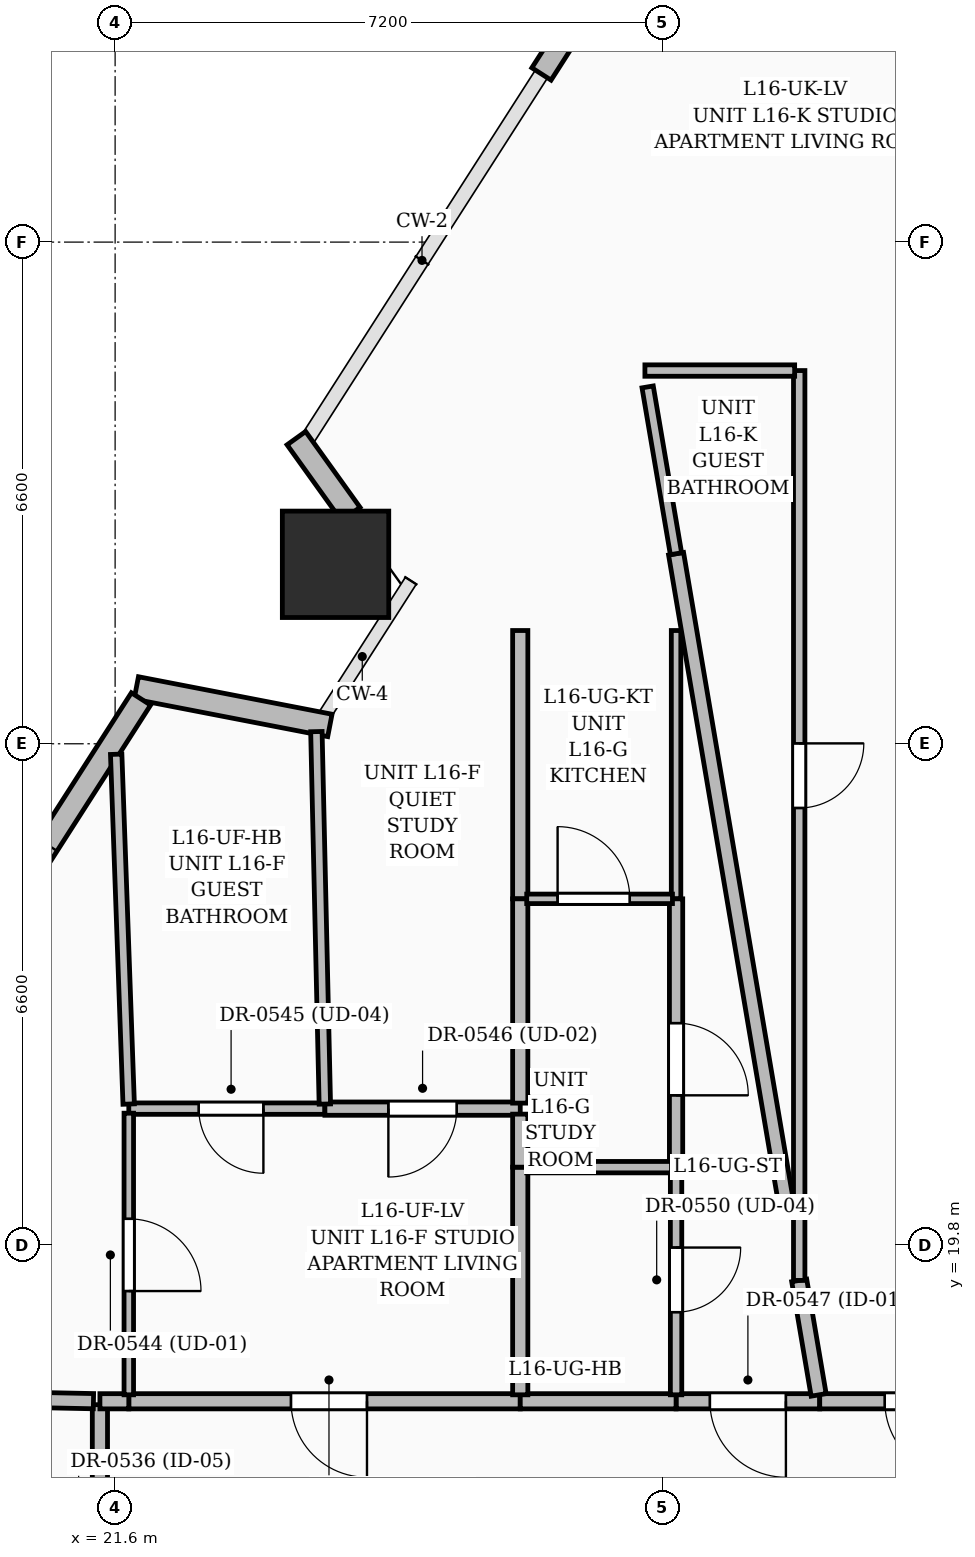
"""IFC4 building model, lengths in metres.
Left out: names, types, materials, properties, quantities, classifications, styles, units other than length and angle.
Written with IfcOpenShell. Run it as: python <this file> out.ifc"""

import sys

from ifc_helpers import new_model, si_unit, direction, frame, frame_2d, origin, origin_2d, place, context, subcontext, project, spatial, rectangle, extrude, element, fill, save


model = new_model("IFC4")
c1 = context("Model", 3, precision=1e-05, world=origin(), true_north=direction((0.0, 1.0)))
c2 = subcontext(c1, "Body", "Model", "MODEL_VIEW")
j1 = project(units=[si_unit("LENGTHUNIT", "METRE"), si_unit("PLANEANGLEUNIT", "RADIAN")], contexts=[c1])
p1 = place(None, origin())
s1 = spatial("IfcSite", under=j1, at=p1, CompositionType="ELEMENT")
p2 = place(p1, origin())
s2 = spatial("IfcBuilding", under=s1, at=p2, CompositionType="ELEMENT")
p3 = place(p2, frame((0.0, 0.0, 67.8)))
s3 = spatial("IfcBuildingStorey", under=s2, at=p3, CompositionType="ELEMENT", Elevation=67.8)
p4 = place(p3, frame((24.5, 28.761, 0.0), z_axis=(0.0, 0.0, 1.0), x_axis=(1.0, 0.0, 0.0)))
e1 = element("IfcColumn", 1, at=p4, inside=s3, PredefinedType="COLUMN", context=c2, shape_type="SweptSolid", body=[
    extrude(rectangle(XDim=1.4, YDim=1.4, at=origin_2d()), origin(), (0.0, 0.0, 1.0), 3.6),
])
p5 = place(p3, frame((21.879, 27.135, 0.0), z_axis=(0.0, 0.0, 1.0), x_axis=(0.981760587394, -0.190121406053, 0.0)))
e2 = element("IfcWall", 2, at=p5, inside=s3, PredefinedType="SOLIDWALL", context=c2, shape_type="SweptSolid", body=[
    extrude(rectangle(XDim=2.594, YDim=0.3, at=frame_2d((1.297, 0.0))), origin(), (0.0, 0.0, 1.0), 2.375),
])
p6 = place(p3, frame((24.7, 29.423, 0.0), z_axis=(0.0, 0.0, 1.0), x_axis=(-0.583004903736, 0.812468634607, 0.0)))
e3 = element("IfcWall", 3, at=p6, inside=s3, PredefinedType="SOLIDWALL", context=c2, shape_type="SweptSolid", body=[
    extrude(rectangle(XDim=1.228, YDim=0.3, at=frame_2d((0.614, 0.0))), origin(), (0.0, 0.0, 1.0), 2.375),
])
p7 = place(p3, frame((27.209, 35.212, 0.0), z_axis=(0.0, 0.0, 1.0), x_axis=(0.539522163193, 0.841971398222, 0.0)))
e4 = element("IfcWall", 4, at=p7, inside=s3, PredefinedType="SOLIDWALL", context=c2, shape_type="SweptSolid", body=[
    extrude(rectangle(XDim=5.826, YDim=0.3, at=frame_2d((2.913, 0.0))), origin(), (0.0, 0.0, 1.0), 3.35),
])
p8 = place(p7, frame((0.625, 0.0, 0.6)))
e5 = element("IfcOpeningElement", 5, at=p8, cuts=e4, PredefinedType="OPENING", context=c2, shape_type="SweptSolid", body=[
    extrude(rectangle(XDim=1.8, YDim=2.1, at=frame_2d((0.9, 1.05))), frame((0.0, 0.16, 0.0), z_axis=(0.0, -1.0, 0.0), x_axis=(1.0, 0.0, 0.0)), (0.0, 0.0, 1.0), 0.32),
])
p9 = place(p3, frame((18.701, 21.934, 0.0), z_axis=(0.0, 0.0, 1.0), x_axis=(0.539511671319, 0.841978121159, 0.0)))
e6 = element("IfcWall", 6, at=p9, inside=s3, PredefinedType="SOLIDWALL", context=c2, shape_type="SweptSolid", body=[
    extrude(rectangle(XDim=6.004, YDim=0.3, at=frame_2d((3.002, 0.0))), origin(), (0.0, 0.0, 1.0), 3.35),
])
p10 = place(p9, frame((1.325, 0.0, 0.6)))
e7 = element("IfcOpeningElement", 7, at=p10, cuts=e6, PredefinedType="OPENING", context=c2, shape_type="SweptSolid", body=[
    extrude(rectangle(XDim=2.4, YDim=2.1, at=frame_2d((1.2, 1.05))), frame((0.0, 0.16, 0.0), z_axis=(0.0, -1.0, 0.0), x_axis=(1.0, 0.0, 0.0)), (0.0, 0.0, 1.0), 0.32),
])
p11 = place(p3, frame((21.4, 17.705, 0.0), z_axis=(0.0, 0.0, 1.0), x_axis=(0.0, -1.0, 0.0)))
e8 = element("IfcWall", 8, at=p11, inside=s3, PredefinedType="PARTITIONING", context=c2, shape_type="SweptSolid", body=[
    extrude(rectangle(XDim=4.955, YDim=0.2, at=frame_2d((2.478, 0.0))), origin(), (0.0, 0.0, 1.0), 2.787),
])
p12 = place(p11, frame((1.597, 0.0, 0.0)))
e9 = element("IfcOpeningElement", 9, at=p12, cuts=e8, PredefinedType="OPENING", context=c2, shape_type="SweptSolid", body=[
    extrude(rectangle(XDim=1.6, YDim=2.3, at=frame_2d((0.8, 1.15))), frame((0.0, 0.11, 0.0), z_axis=(0.0, -1.0, 0.0), x_axis=(1.0, 0.0, 0.0)), (0.0, 0.0, 1.0), 0.22),
])
p13 = place(p3, frame((26.93, 17.75, 0.0), z_axis=(0.0, 0.0, 1.0), x_axis=(-1.0, 0.0, 0.0)))
e10 = element("IfcWall", 10, at=p13, inside=s3, PredefinedType="PARTITIONING", context=c2, shape_type="SweptSolid", body=[
    extrude(rectangle(XDim=5.15, YDim=0.2, at=frame_2d((2.575, 0.0))), origin(), (0.0, 0.0, 1.0), 2.279),
])
p14 = place(p13, frame((2.016, 0.0, 0.0)))
e11 = element("IfcOpeningElement", 11, at=p14, cuts=e10, PredefinedType="OPENING", context=c2, shape_type="SweptSolid", body=[
    extrude(rectangle(XDim=1.0, YDim=2.2, at=frame_2d((0.5, 1.1))), frame((0.0, 0.11, 0.0), z_axis=(0.0, -1.0, 0.0), x_axis=(1.0, 0.0, 0.0)), (0.0, 0.0, 1.0), 0.22),
])
p15 = place(p3, frame((21.78, 17.75, 0.0), z_axis=(0.0, 0.0, 1.0), x_axis=(-1.0, 0.0, 0.0)))
e12 = element("IfcWall", 12, at=p15, inside=s3, PredefinedType="PARTITIONING", context=c2, shape_type="SweptSolid", body=[
    extrude(rectangle(XDim=0.38, YDim=0.2, at=frame_2d((0.19, 0.0))), origin(), (0.0, 0.0, 1.0), 3.35),
])
p16 = place(p3, frame((30.87, 17.75, 0.0), z_axis=(0.0, 0.0, 1.0), x_axis=(-1.0, 0.0, 0.0)))
e13 = element("IfcWall", 13, at=p16, inside=s3, PredefinedType="PARTITIONING", context=c2, shape_type="SweptSolid", body=[
    extrude(rectangle(XDim=1.89, YDim=0.2, at=frame_2d((0.945, 0.0))), origin(), (0.0, 0.0, 1.0), 3.35),
])
p17 = place(p16, frame((0.445, 0.0, 0.0)))
e14 = element("IfcOpeningElement", 14, at=p17, cuts=e13, PredefinedType="OPENING", context=c2, shape_type="SweptSolid", body=[
    extrude(rectangle(XDim=1.0, YDim=2.2, at=frame_2d((0.5, 1.1))), frame((0.0, 0.11, 0.0), z_axis=(0.0, -1.0, 0.0), x_axis=(1.0, 0.0, 0.0)), (0.0, 0.0, 1.0), 0.22),
])
p18 = place(p3, frame((28.98, 17.75, 0.0), z_axis=(0.0, 0.0, 1.0), x_axis=(-1.0, 0.0, 0.0)))
e15 = element("IfcWall", 15, at=p18, inside=s3, PredefinedType="PARTITIONING", context=c2, shape_type="SweptSolid", body=[
    extrude(rectangle(XDim=2.05, YDim=0.2, at=frame_2d((1.025, 0.0))), origin(), (0.0, 0.0, 1.0), 2.787),
])
p19 = place(p3, frame((34.06, 17.75, 0.0), z_axis=(0.0, 0.0, 1.0), x_axis=(-1.0, 0.0, 0.0)))
e16 = element("IfcWall", 16, at=p19, inside=s3, PredefinedType="PARTITIONING", context=c2, shape_type="SweptSolid", body=[
    extrude(rectangle(XDim=3.19, YDim=0.2, at=frame_2d((1.595, 0.0))), origin(), (0.0, 0.0, 1.0), 2.309),
])
p20 = place(p19, frame((1.334, 0.0, 0.0)))
e17 = element("IfcOpeningElement", 17, at=p20, cuts=e16, PredefinedType="OPENING", context=c2, shape_type="SweptSolid", body=[
    extrude(rectangle(XDim=1.0, YDim=2.2, at=frame_2d((0.5, 1.1))), frame((0.0, 0.11, 0.0), z_axis=(0.0, -1.0, 0.0), x_axis=(1.0, 0.0, 0.0)), (0.0, 0.0, 1.0), 0.22),
])
p21 = place(p3, frame((21.315, 17.751, 0.0), z_axis=(0.0, 0.0, 1.0), x_axis=(-0.999792117948, 0.020389234651, 0.0)))
e18 = element("IfcWall", 18, at=p21, inside=s3, PredefinedType="PARTITIONING", context=c2, shape_type="SweptSolid", body=[
    extrude(rectangle(XDim=5.089, YDim=0.2, at=frame_2d((2.544, 0.0))), origin(), (0.0, 0.0, 1.0), 2.37),
])
p22 = place(p3, frame((24.36, 21.6, 0.0), z_axis=(0.0, 0.0, 1.0), x_axis=(-1.0, 0.0, 0.0)))
e19 = element("IfcWall", 19, at=p22, inside=s3, PredefinedType="PARTITIONING", context=c2, shape_type="SweptSolid", body=[
    extrude(rectangle(XDim=2.58, YDim=0.15, at=frame_2d((1.29, 0.0))), origin(), (0.0, 0.0, 1.0), 2.787),
])
p23 = place(p22, frame((0.809, 0.0, 0.0)))
e20 = element("IfcOpeningElement", 20, at=p23, cuts=e19, PredefinedType="OPENING", context=c2, shape_type="SweptSolid", body=[
    extrude(rectangle(XDim=0.85, YDim=2.1, at=frame_2d((0.425, 1.05))), frame((0.0, 0.085, 0.0), z_axis=(0.0, -1.0, 0.0), x_axis=(1.0, 0.0, 0.0)), (0.0, 0.0, 1.0), 0.17),
])
p24 = place(p3, frame((21.78, 21.54, 0.0), z_axis=(0.0, 0.0, 1.0), x_axis=(0.0, -1.0, 0.0)))
e21 = element("IfcWall", 21, at=p24, inside=s3, PredefinedType="PARTITIONING", context=c2, shape_type="SweptSolid", body=[
    extrude(rectangle(XDim=3.705, YDim=0.125, at=frame_2d((1.853, 0.0))), origin(), (0.0, 0.0, 1.0), 2.279),
])
p25 = place(p24, frame((1.39, 0.0, 0.0)))
e22 = element("IfcOpeningElement", 22, at=p25, cuts=e21, PredefinedType="OPENING", context=c2, shape_type="SweptSolid", body=[
    extrude(rectangle(XDim=0.95, YDim=2.2, at=frame_2d((0.475, 1.1))), frame((0.0, 0.072, 0.0), z_axis=(0.0, -1.0, 0.0), x_axis=(1.0, 0.0, 0.0)), (0.0, 0.0, 1.0), 0.145),
])
p26 = place(p3, frame((26.93, 21.6, 0.0), z_axis=(0.0, 0.0, 1.0), x_axis=(-1.0, 0.0, 0.0)))
e23 = element("IfcWall", 23, at=p26, inside=s3, PredefinedType="PARTITIONING", context=c2, shape_type="SweptSolid", body=[
    extrude(rectangle(XDim=2.57, YDim=0.175, at=frame_2d((1.285, 0.0))), origin(), (0.0, 0.0, 1.0), 3.35),
])
p27 = place(p26, frame((0.835, 0.0, 0.0)))
e24 = element("IfcOpeningElement", 24, at=p27, cuts=e23, PredefinedType="OPENING", context=c2, shape_type="SweptSolid", body=[
    extrude(rectangle(XDim=0.9, YDim=2.15, at=frame_2d((0.45, 1.075))), frame((0.0, 0.097, 0.0), z_axis=(0.0, -1.0, 0.0), x_axis=(1.0, 0.0, 0.0)), (0.0, 0.0, 1.0), 0.195),
])
p28 = place(p3, frame((26.93, 17.835, 0.0), z_axis=(0.0, 0.0, 1.0), x_axis=(0.0, 1.0, 0.0)))
e25 = element("IfcWall", 25, at=p28, inside=s3, PredefinedType="PARTITIONING", context=c2, shape_type="SweptSolid", body=[
    extrude(rectangle(XDim=2.995, YDim=0.2, at=frame_2d((1.498, 0.0))), origin(), (0.0, 0.0, 1.0), 2.787),
])
p29 = place(p3, frame((26.93, 20.83, 0.0), z_axis=(0.0, 0.0, 1.0), x_axis=(0.0, 1.0, 0.0)))
e26 = element("IfcWall", 26, at=p29, inside=s3, PredefinedType="PARTITIONING", context=c2, shape_type="SweptSolid", body=[
    extrude(rectangle(XDim=0.698, YDim=0.2, at=frame_2d((0.349, 0.0))), origin(), (0.0, 0.0, 1.0), 2.787),
])
p30 = place(p3, frame((21.614, 26.262, 0.0), z_axis=(0.0, 0.0, 1.0), x_axis=(0.035733133252, -0.999361367668, 0.0)))
e27 = element("IfcWall", 27, at=p30, inside=s3, PredefinedType="PARTITIONING", context=c2, shape_type="SweptSolid", body=[
    extrude(rectangle(XDim=4.605, YDim=0.15, at=frame_2d((2.302, 0.0))), origin(), (0.0, 0.0, 1.0), 2.37),
])
p31 = place(p3, frame((24.359, 21.66, 0.0), z_axis=(0.0, 0.0, 1.0), x_axis=(-0.02266370042, 0.999743145354, 0.0)))
e28 = element("IfcWall", 28, at=p31, inside=s3, PredefinedType="PARTITIONING", context=c2, shape_type="SweptSolid", body=[
    extrude(rectangle(XDim=4.901, YDim=0.15, at=frame_2d((2.451, 0.0))), origin(), (0.0, 0.0, 1.0), 2.787),
])
p32 = place(p3, frame((26.93, 24.36, 0.0), z_axis=(0.0, 0.0, 1.0), x_axis=(0.0, 1.0, 0.0)))
e29 = element("IfcWall", 29, at=p32, inside=s3, PredefinedType="PARTITIONING", context=c2, shape_type="SweptSolid", body=[
    extrude(rectangle(XDim=3.53, YDim=0.2, at=frame_2d((1.765, 0.0))), origin(), (0.0, 0.0, 1.0), 2.279),
])
p33 = place(p3, frame((26.93, 21.673, 0.0), z_axis=(0.0, 0.0, 1.0), x_axis=(0.0, 1.0, 0.0)))
e30 = element("IfcWall", 30, at=p33, inside=s3, PredefinedType="PARTITIONING", context=c2, shape_type="SweptSolid", body=[
    extrude(rectangle(XDim=2.688, YDim=0.2, at=frame_2d((1.344, 0.0))), origin(), (0.0, 0.0, 1.0), 3.35),
])
p34 = place(p3, frame((28.98, 20.83, 0.0), z_axis=(0.0, 0.0, 1.0), x_axis=(0.0, -1.0, 0.0)))
e31 = element("IfcWall", 31, at=p34, inside=s3, PredefinedType="PARTITIONING", context=c2, shape_type="SweptSolid", body=[
    extrude(rectangle(XDim=2.995, YDim=0.15, at=frame_2d((1.498, 0.0))), origin(), (0.0, 0.0, 1.0), 2.787),
])
p35 = place(p34, frame((1.058, 0.0, 0.0)))
e32 = element("IfcOpeningElement", 32, at=p35, cuts=e31, PredefinedType="OPENING", context=c2, shape_type="SweptSolid", body=[
    extrude(rectangle(XDim=0.85, YDim=2.1, at=frame_2d((0.425, 1.05))), frame((0.0, 0.085, 0.0), z_axis=(0.0, -1.0, 0.0), x_axis=(1.0, 0.0, 0.0)), (0.0, 0.0, 1.0), 0.17),
])
p36 = place(p3, frame((28.98, 27.89, 0.0), z_axis=(0.0, 0.0, 1.0), x_axis=(0.0, -1.0, 0.0)))
e33 = element("IfcWall", 33, at=p36, inside=s3, PredefinedType="PARTITIONING", context=c2, shape_type="SweptSolid", body=[
    extrude(rectangle(XDim=3.53, YDim=0.125, at=frame_2d((1.765, 0.0))), origin(), (0.0, 0.0, 1.0), 3.35),
])
p37 = place(p3, frame((28.98, 24.36, 0.0), z_axis=(0.0, 0.0, 1.0), x_axis=(0.0, -1.0, 0.0)))
e34 = element("IfcWall", 34, at=p37, inside=s3, PredefinedType="PARTITIONING", context=c2, shape_type="SweptSolid", body=[
    extrude(rectangle(XDim=3.53, YDim=0.175, at=frame_2d((1.765, 0.0))), origin(), (0.0, 0.0, 1.0), 2.279),
])
p38 = place(p37, frame((1.635, 0.0, 0.0)))
e35 = element("IfcOpeningElement", 35, at=p38, cuts=e34, PredefinedType="OPENING", context=c2, shape_type="SweptSolid", body=[
    extrude(rectangle(XDim=0.95, YDim=2.2, at=frame_2d((0.475, 1.1))), frame((0.0, 0.097, 0.0), z_axis=(0.0, -1.0, 0.0), x_axis=(1.0, 0.0, 0.0)), (0.0, 0.0, 1.0), 0.195),
])
p39 = place(p3, frame((30.856, 17.834, 0.0), z_axis=(0.0, 0.0, 1.0), x_axis=(-0.167300412549, 0.98590596507, 0.0)))
e36 = element("IfcWall", 36, at=p39, inside=s3, PredefinedType="PARTITIONING", context=c2, shape_type="SweptSolid", body=[
    extrude(rectangle(XDim=1.528, YDim=0.2, at=frame_2d((0.764, 0.0))), origin(), (0.0, 0.0, 1.0), 3.35),
])
p40 = place(p3, frame((30.44, 20.284, 0.0), z_axis=(0.0, 0.0, 1.0), x_axis=(-0.167066803371, 0.98594557822, 0.0)))
e37 = element("IfcWall", 37, at=p40, inside=s3, PredefinedType="PARTITIONING", context=c2, shape_type="SweptSolid", body=[
    extrude(rectangle(XDim=8.739, YDim=0.2, at=frame_2d((4.369, 0.0))), origin(), (0.0, 0.0, 1.0), 2.279),
])
p41 = place(p3, frame((28.92, 20.83, 0.0), z_axis=(0.0, 0.0, 1.0), x_axis=(-1.0, 0.0, 0.0)))
e38 = element("IfcWall", 38, at=p41, inside=s3, PredefinedType="PARTITIONING", context=c2, shape_type="SweptSolid", body=[
    extrude(rectangle(XDim=1.905, YDim=0.15, at=frame_2d((0.953, 0.0))), origin(), (0.0, 0.0, 1.0), 3.35),
])
p42 = place(p3, frame((27.015, 24.36, 0.0), z_axis=(0.0, 0.0, 1.0), x_axis=(1.0, 0.0, 0.0)))
e39 = element("IfcWall", 39, at=p42, inside=s3, PredefinedType="PARTITIONING", context=c2, shape_type="SweptSolid", body=[
    extrude(rectangle(XDim=1.918, YDim=0.125, at=frame_2d((0.959, 0.0))), origin(), (0.0, 0.0, 1.0), 2.279),
])
p43 = place(p42, frame((0.406, 0.0, 0.0)))
e40 = element("IfcOpeningElement", 40, at=p43, cuts=e39, PredefinedType="OPENING", context=c2, shape_type="SweptSolid", body=[
    extrude(rectangle(XDim=0.95, YDim=2.2, at=frame_2d((0.475, 1.1))), frame((0.0, 0.072, 0.0), z_axis=(0.0, -1.0, 0.0), x_axis=(1.0, 0.0, 0.0)), (0.0, 0.0, 1.0), 0.145),
])
p44 = place(p3, frame((30.6, 31.31, 0.0), z_axis=(0.0, 0.0, 1.0), x_axis=(0.0, -1.0, 0.0)))
e41 = element("IfcWall", 41, at=p44, inside=s3, PredefinedType="PARTITIONING", context=c2, shape_type="SweptSolid", body=[
    extrude(rectangle(XDim=11.97, YDim=0.15, at=frame_2d((5.985, 0.0))), origin(), (0.0, 0.0, 1.0), 2.279),
])
p45 = place(p44, frame((4.905, 0.0, 0.0)))
e42 = element("IfcOpeningElement", 42, at=p45, cuts=e41, PredefinedType="OPENING", context=c2, shape_type="SweptSolid", body=[
    extrude(rectangle(XDim=0.85, YDim=2.1, at=frame_2d((0.425, 1.05))), frame((0.0, 0.085, 0.0), z_axis=(0.0, -1.0, 0.0), x_axis=(1.0, 0.0, 0.0)), (0.0, 0.0, 1.0), 0.17),
])
p46 = place(p3, frame((30.54, 31.31, 0.0), z_axis=(0.0, 0.0, 1.0), x_axis=(-1.0, 0.0, 0.0)))
e43 = element("IfcWall", 43, at=p46, inside=s3, PredefinedType="PARTITIONING", context=c2, shape_type="SweptSolid", body=[
    extrude(rectangle(XDim=1.97, YDim=0.15, at=frame_2d((0.985, 0.0))), origin(), (0.0, 0.0, 1.0), 2.787),
])
p47 = place(p3, frame((28.606, 31.095, 0.0), z_axis=(0.0, 0.0, 1.0), x_axis=(0.167545405698, -0.985864360361, 0.0)))
e44 = element("IfcWall", 44, at=p47, inside=s3, PredefinedType="PARTITIONING", context=c2, shape_type="SweptSolid", body=[
    extrude(rectangle(XDim=2.227, YDim=0.15, at=frame_2d((1.113, 0.0))), origin(), (0.0, 0.0, 1.0), 2.787),
])
p48 = place(p14, origin())
e45 = element("IfcDoor", 45, at=p48, inside=s3, OperationType="SINGLE_SWING_LEFT", PredefinedType="DOOR", context=c2, shape_type="SweptSolid", body=[
    extrude(rectangle(XDim=1.0, YDim=2.2, at=frame_2d((0.5, 1.1))), frame((0.0, 0.025, 0.0), z_axis=(0.0, -1.0, 0.0), x_axis=(1.0, 0.0, 0.0)), (0.0, 0.0, 1.0), 0.05),
])
fill(e11, e45)
p49 = place(p25, origin())
e46 = element("IfcDoor", 46, at=p49, inside=s3, OperationType="SINGLE_SWING_RIGHT", PredefinedType="DOOR", context=c2, shape_type="SweptSolid", body=[
    extrude(rectangle(XDim=0.95, YDim=2.2, at=frame_2d((0.475, 1.1))), frame((0.0, 0.025, 0.0), z_axis=(0.0, -1.0, 0.0), x_axis=(1.0, 0.0, 0.0)), (0.0, 0.0, 1.0), 0.05),
])
fill(e22, e46)
p50 = place(p23, origin())
e47 = element("IfcDoor", 47, at=p50, inside=s3, OperationType="SINGLE_SWING_LEFT", PredefinedType="DOOR", context=c2, shape_type="SweptSolid", body=[
    extrude(rectangle(XDim=0.85, YDim=2.1, at=frame_2d((0.425, 1.05))), frame((0.0, 0.025, 0.0), z_axis=(0.0, -1.0, 0.0), x_axis=(1.0, 0.0, 0.0)), (0.0, 0.0, 1.0), 0.05),
])
fill(e20, e47)
p51 = place(p27, origin())
e48 = element("IfcDoor", 48, at=p51, inside=s3, OperationType="SINGLE_SWING_RIGHT", PredefinedType="DOOR", context=c2, shape_type="SweptSolid", body=[
    extrude(rectangle(XDim=0.9, YDim=2.15, at=frame_2d((0.45, 1.075))), frame((0.0, 0.025, 0.0), z_axis=(0.0, -1.0, 0.0), x_axis=(1.0, 0.0, 0.0)), (0.0, 0.0, 1.0), 0.05),
])
fill(e24, e48)
p52 = place(p17, origin())
e49 = element("IfcDoor", 49, at=p52, inside=s3, OperationType="SINGLE_SWING_LEFT", PredefinedType="DOOR", context=c2, shape_type="SweptSolid", body=[
    extrude(rectangle(XDim=1.0, YDim=2.2, at=frame_2d((0.5, 1.1))), frame((0.0, 0.025, 0.0), z_axis=(0.0, -1.0, 0.0), x_axis=(1.0, 0.0, 0.0)), (0.0, 0.0, 1.0), 0.05),
])
fill(e14, e49)
p53 = place(p43, origin())
e50 = element("IfcDoor", 50, at=p53, inside=s3, OperationType="SINGLE_SWING_LEFT", PredefinedType="DOOR", context=c2, shape_type="SweptSolid", body=[
    extrude(rectangle(XDim=0.95, YDim=2.2, at=frame_2d((0.475, 1.1))), frame((0.0, 0.025, 0.0), z_axis=(0.0, -1.0, 0.0), x_axis=(1.0, 0.0, 0.0)), (0.0, 0.0, 1.0), 0.05),
])
fill(e40, e50)
p54 = place(p38, origin())
e51 = element("IfcDoor", 51, at=p54, inside=s3, OperationType="SINGLE_SWING_RIGHT", PredefinedType="DOOR", context=c2, shape_type="SweptSolid", body=[
    extrude(rectangle(XDim=0.95, YDim=2.2, at=frame_2d((0.475, 1.1))), frame((0.0, 0.025, 0.0), z_axis=(0.0, -1.0, 0.0), x_axis=(1.0, 0.0, 0.0)), (0.0, 0.0, 1.0), 0.05),
])
fill(e35, e51)
p55 = place(p35, origin())
e52 = element("IfcDoor", 52, at=p55, inside=s3, OperationType="SINGLE_SWING_LEFT", PredefinedType="DOOR", context=c2, shape_type="SweptSolid", body=[
    extrude(rectangle(XDim=0.85, YDim=2.1, at=frame_2d((0.425, 1.05))), frame((0.0, 0.025, 0.0), z_axis=(0.0, -1.0, 0.0), x_axis=(1.0, 0.0, 0.0)), (0.0, 0.0, 1.0), 0.05),
])
fill(e32, e52)
p56 = place(p20, origin())
e53 = element("IfcDoor", 53, at=p56, inside=s3, OperationType="SINGLE_SWING_LEFT", PredefinedType="DOOR", context=c2, shape_type="SweptSolid", body=[
    extrude(rectangle(XDim=1.0, YDim=2.2, at=frame_2d((0.5, 1.1))), frame((0.0, 0.025, 0.0), z_axis=(0.0, -1.0, 0.0), x_axis=(1.0, 0.0, 0.0)), (0.0, 0.0, 1.0), 0.05),
])
fill(e17, e53)
p57 = place(p45, origin())
e54 = element("IfcDoor", 54, at=p57, inside=s3, OperationType="SINGLE_SWING_LEFT", PredefinedType="DOOR", context=c2, shape_type="SweptSolid", body=[
    extrude(rectangle(XDim=0.85, YDim=2.1, at=frame_2d((0.425, 1.05))), frame((0.0, 0.025, 0.0), z_axis=(0.0, -1.0, 0.0), x_axis=(1.0, 0.0, 0.0)), (0.0, 0.0, 1.0), 0.05),
])
fill(e42, e54)
save(model, sys.argv[1])
